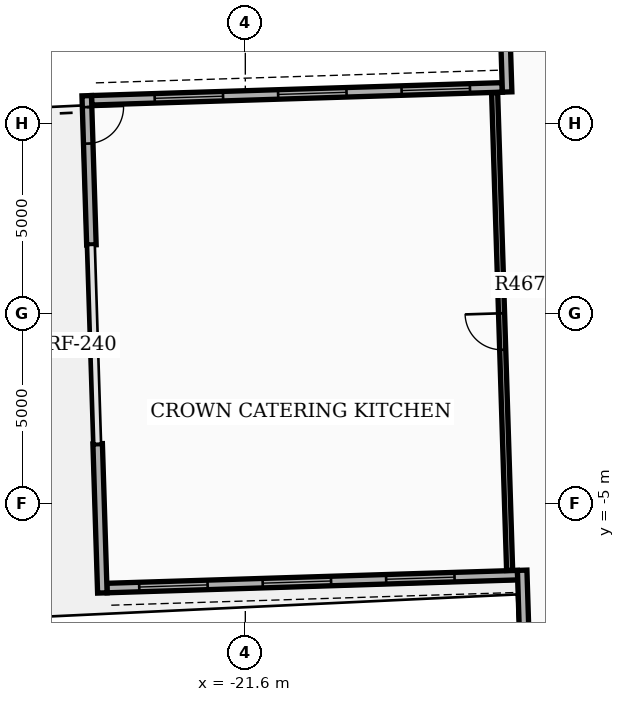
"""IFC4 building model, lengths in metres.
Left out: names, types, materials, properties, quantities, classifications, styles, units other than length and angle.
Written with IfcOpenShell. Run it as: python <this file> out.ifc"""

import sys

from ifc_helpers import new_model, si_unit, direction, frame, frame_2d, origin, place, context, subcontext, project, spatial, rectangle, extrude, element, fill, save


model = new_model("IFC4")
c1 = context("Model", 3, precision=1e-05, world=origin(), true_north=direction((0.0, 1.0)))
c2 = subcontext(c1, "Body", "Model", "MODEL_VIEW")
j1 = project(units=[si_unit("LENGTHUNIT", "METRE"), si_unit("PLANEANGLEUNIT", "RADIAN")], contexts=[c1])
p1 = place(None, origin())
s1 = spatial("IfcSite", under=j1, at=p1, CompositionType="ELEMENT")
p2 = place(p1, origin())
s2 = spatial("IfcBuilding", under=s1, at=p2, CompositionType="ELEMENT")
p3 = place(p2, frame((0.0, 0.0, 299.4)))
s3 = spatial("IfcBuildingStorey", under=s2, at=p3, CompositionType="ELEMENT", Elevation=299.4)
p4 = place(p3, frame((-14.839, 5.957, 0.0), z_axis=(0.0, 0.0, 1.0), x_axis=(-0.999506419134, -0.031415252825, 0.0)))
e1 = element("IfcWall", 1, at=p4, inside=s3, PredefinedType="STANDARD", context=c2, shape_type="SweptSolid", body=[
    extrude(rectangle(XDim=10.81, YDim=0.25, at=frame_2d((5.405, 0.0))), origin(), (0.0, 0.0, 1.0), 3.73),
])
p5 = place(p4, frame((0.85, 0.0, 0.8)))
e2 = element("IfcOpeningElement", 2, at=p5, cuts=e1, PredefinedType="OPENING", context=c2, shape_type="SweptSolid", body=[
    extrude(rectangle(XDim=1.8, YDim=1.8, at=frame_2d((0.9, 0.9))), frame((0.0, 0.135, 0.0), z_axis=(0.0, -1.0, 0.0), x_axis=(1.0, 0.0, 0.0)), (0.0, 0.0, 1.0), 0.27),
])
p6 = place(p4, frame((4.1, 0.0, 0.8)))
e3 = element("IfcOpeningElement", 3, at=p6, cuts=e1, PredefinedType="OPENING", context=c2, shape_type="SweptSolid", body=[
    extrude(rectangle(XDim=1.8, YDim=1.8, at=frame_2d((0.9, 0.9))), frame((0.0, 0.135, 0.0), z_axis=(0.0, -1.0, 0.0), x_axis=(1.0, 0.0, 0.0)), (0.0, 0.0, 1.0), 0.27),
])
p7 = place(p4, frame((7.35, 0.0, 0.8)))
e4 = element("IfcOpeningElement", 4, at=p7, cuts=e1, PredefinedType="OPENING", context=c2, shape_type="SweptSolid", body=[
    extrude(rectangle(XDim=1.8, YDim=1.8, at=frame_2d((0.9, 0.9))), frame((0.0, 0.135, 0.0), z_axis=(0.0, -1.0, 0.0), x_axis=(1.0, 0.0, 0.0)), (0.0, 0.0, 1.0), 0.27),
])
p8 = place(p3, frame((-25.241, -7.216, 0.0), z_axis=(0.0, 0.0, 1.0), x_axis=(0.999506419134, 0.031415252825, 0.0)))
e5 = element("IfcWall", 5, at=p8, inside=s3, PredefinedType="STANDARD", context=c2, shape_type="SweptSolid", body=[
    extrude(rectangle(XDim=10.81, YDim=0.25, at=frame_2d((5.405, 0.0))), origin(), (0.0, 0.0, 1.0), 3.73),
])
p9 = place(p8, frame((0.85, 0.0, 0.8)))
e6 = element("IfcOpeningElement", 6, at=p9, cuts=e5, PredefinedType="OPENING", context=c2, shape_type="SweptSolid", body=[
    extrude(rectangle(XDim=1.8, YDim=1.8, at=frame_2d((0.9, 0.9))), frame((0.0, 0.135, 0.0), z_axis=(0.0, -1.0, 0.0), x_axis=(1.0, 0.0, 0.0)), (0.0, 0.0, 1.0), 0.27),
])
p10 = place(p8, frame((4.1, 0.0, 0.8)))
e7 = element("IfcOpeningElement", 7, at=p10, cuts=e5, PredefinedType="OPENING", context=c2, shape_type="SweptSolid", body=[
    extrude(rectangle(XDim=1.8, YDim=1.8, at=frame_2d((0.9, 0.9))), frame((0.0, 0.135, 0.0), z_axis=(0.0, -1.0, 0.0), x_axis=(1.0, 0.0, 0.0)), (0.0, 0.0, 1.0), 0.27),
])
p11 = place(p8, frame((7.35, 0.0, 0.8)))
e8 = element("IfcOpeningElement", 8, at=p11, cuts=e5, PredefinedType="OPENING", context=c2, shape_type="SweptSolid", body=[
    extrude(rectangle(XDim=1.8, YDim=1.8, at=frame_2d((0.9, 0.9))), frame((0.0, 0.135, 0.0), z_axis=(0.0, -1.0, 0.0), x_axis=(1.0, 0.0, 0.0)), (0.0, 0.0, 1.0), 0.27),
])
p12 = place(p3, frame((-25.773, 5.738, 0.0), z_axis=(0.0, 0.0, 1.0), x_axis=(0.031395848079, -0.999507028851, 0.0)))
e9 = element("IfcWall", 9, at=p12, inside=s3, PredefinedType="STANDARD", context=c2, shape_type="SweptSolid", body=[
    extrude(rectangle(XDim=3.927, YDim=0.25, at=frame_2d((1.963, 0.0))), origin(), (0.0, 0.0, 1.0), 3.73),
])
p13 = place(p12, frame((0.3, 0.0, 0.0)))
e10 = element("IfcOpeningElement", 10, at=p13, cuts=e9, PredefinedType="OPENING", context=c2, shape_type="SweptSolid", body=[
    extrude(rectangle(XDim=0.96, YDim=2.1, at=frame_2d((0.48, 1.05))), frame((0.0, 0.135, 0.0), z_axis=(0.0, -1.0, 0.0), x_axis=(1.0, 0.0, 0.0)), (0.0, 0.0, 1.0), 0.27),
])
p14 = place(p3, frame((-25.485, -3.42, 0.0), z_axis=(0.0, 0.0, 1.0), x_axis=(0.031395848079, -0.999507028851, 0.0)))
e11 = element("IfcWall", 11, at=p14, inside=s3, PredefinedType="STANDARD", context=c2, shape_type="SweptSolid", body=[
    extrude(rectangle(XDim=3.927, YDim=0.25, at=frame_2d((1.963, 0.0))), origin(), (0.0, 0.0, 1.0), 3.73),
])
p15 = place(p3, frame((-14.711, 5.836, 0.0), z_axis=(0.0, 0.0, 1.0), x_axis=(-0.031399429229, 0.999506916356, 0.0)))
e12 = element("IfcWall", 12, at=p15, inside=s3, PredefinedType="STANDARD", context=c2, shape_type="SweptSolid", body=[
    extrude(rectangle(XDim=6.85, YDim=0.25, at=frame_2d((3.425, 0.0))), origin(), (0.0, 0.0, 1.0), 3.73),
])
p16 = place(p3, frame((-14.315, -6.748, 0.0), z_axis=(0.0, 0.0, 1.0), x_axis=(0.03143615455, -0.999505761958, 0.0)))
e13 = element("IfcWall", 13, at=p16, inside=s3, PredefinedType="STANDARD", context=c2, shape_type="SweptSolid", body=[
    extrude(rectangle(XDim=6.85, YDim=0.25, at=frame_2d((3.425, 0.0))), origin(), (0.0, 0.0, 1.0), 3.73),
])
p17 = place(p3, frame((-14.645, -6.75, 0.0), z_axis=(0.0, 0.0, 1.0), x_axis=(-0.031415998373, 0.999506395701, 0.0)))
e14 = element("IfcWall", 14, at=p17, inside=s3, PredefinedType="PARTITIONING", context=c2, shape_type="SweptSolid", body=[
    extrude(rectangle(XDim=12.574, YDim=0.16, at=frame_2d((6.287, 0.0))), origin(), (0.0, 0.0, 1.0), 3.72),
])
p18 = place(p17, frame((5.807, 0.0, 0.0)))
e15 = element("IfcOpeningElement", 15, at=p18, cuts=e14, PredefinedType="OPENING", context=c2, shape_type="SweptSolid", body=[
    extrude(rectangle(XDim=0.96, YDim=2.15, at=frame_2d((0.48, 1.075))), frame((0.0, 0.09, 0.0), z_axis=(0.0, -1.0, 0.0), x_axis=(1.0, 0.0, 0.0)), (0.0, 0.0, 1.0), 0.18),
])
p19 = place(p5, origin())
e16 = element("IfcWindow", 16, at=p19, inside=s3, PartitioningType="SINGLE_PANEL", PredefinedType="WINDOW", context=c2, shape_type="SweptSolid", body=[
    extrude(rectangle(XDim=1.8, YDim=1.8, at=frame_2d((0.9, 0.9))), frame((0.0, 0.03, 0.0), z_axis=(0.0, -1.0, 0.0), x_axis=(1.0, 0.0, 0.0)), (0.0, 0.0, 1.0), 0.06),
])
fill(e2, e16)
p20 = place(p6, origin())
e17 = element("IfcWindow", 17, at=p20, inside=s3, PartitioningType="SINGLE_PANEL", PredefinedType="WINDOW", context=c2, shape_type="SweptSolid", body=[
    extrude(rectangle(XDim=1.8, YDim=1.8, at=frame_2d((0.9, 0.9))), frame((0.0, 0.03, 0.0), z_axis=(0.0, -1.0, 0.0), x_axis=(1.0, 0.0, 0.0)), (0.0, 0.0, 1.0), 0.06),
])
fill(e3, e17)
p21 = place(p7, origin())
e18 = element("IfcWindow", 18, at=p21, inside=s3, PartitioningType="SINGLE_PANEL", PredefinedType="WINDOW", context=c2, shape_type="SweptSolid", body=[
    extrude(rectangle(XDim=1.8, YDim=1.8, at=frame_2d((0.9, 0.9))), frame((0.0, 0.03, 0.0), z_axis=(0.0, -1.0, 0.0), x_axis=(1.0, 0.0, 0.0)), (0.0, 0.0, 1.0), 0.06),
])
fill(e4, e18)
p22 = place(p9, origin())
e19 = element("IfcWindow", 19, at=p22, inside=s3, PartitioningType="SINGLE_PANEL", PredefinedType="WINDOW", context=c2, shape_type="SweptSolid", body=[
    extrude(rectangle(XDim=1.8, YDim=1.8, at=frame_2d((0.9, 0.9))), frame((0.0, 0.03, 0.0), z_axis=(0.0, -1.0, 0.0), x_axis=(1.0, 0.0, 0.0)), (0.0, 0.0, 1.0), 0.06),
])
fill(e6, e19)
p23 = place(p10, origin())
e20 = element("IfcWindow", 20, at=p23, inside=s3, PartitioningType="SINGLE_PANEL", PredefinedType="WINDOW", context=c2, shape_type="SweptSolid", body=[
    extrude(rectangle(XDim=1.8, YDim=1.8, at=frame_2d((0.9, 0.9))), frame((0.0, 0.03, 0.0), z_axis=(0.0, -1.0, 0.0), x_axis=(1.0, 0.0, 0.0)), (0.0, 0.0, 1.0), 0.06),
])
fill(e7, e20)
p24 = place(p11, origin())
e21 = element("IfcWindow", 21, at=p24, inside=s3, PartitioningType="SINGLE_PANEL", PredefinedType="WINDOW", context=c2, shape_type="SweptSolid", body=[
    extrude(rectangle(XDim=1.8, YDim=1.8, at=frame_2d((0.9, 0.9))), frame((0.0, 0.03, 0.0), z_axis=(0.0, -1.0, 0.0), x_axis=(1.0, 0.0, 0.0)), (0.0, 0.0, 1.0), 0.06),
])
fill(e8, e21)
p25 = place(p13, origin())
e22 = element("IfcDoor", 22, at=p25, inside=s3, OperationType="SINGLE_SWING_LEFT", PredefinedType="DOOR", context=c2, shape_type="SweptSolid", body=[
    extrude(rectangle(XDim=0.96, YDim=2.1, at=frame_2d((0.48, 1.05))), frame((0.0, 0.025, 0.0), z_axis=(0.0, -1.0, 0.0), x_axis=(1.0, 0.0, 0.0)), (0.0, 0.0, 1.0), 0.05),
])
fill(e10, e22)
p26 = place(p18, origin())
e23 = element("IfcDoor", 23, at=p26, inside=s3, OperationType="SINGLE_SWING_RIGHT", PredefinedType="DOOR", context=c2, shape_type="SweptSolid", body=[
    extrude(rectangle(XDim=0.96, YDim=2.15, at=frame_2d((0.48, 1.075))), frame((0.0, 0.025, 0.0), z_axis=(0.0, -1.0, 0.0), x_axis=(1.0, 0.0, 0.0)), (0.0, 0.0, 1.0), 0.05),
])
fill(e15, e23)
save(model, sys.argv[1])
